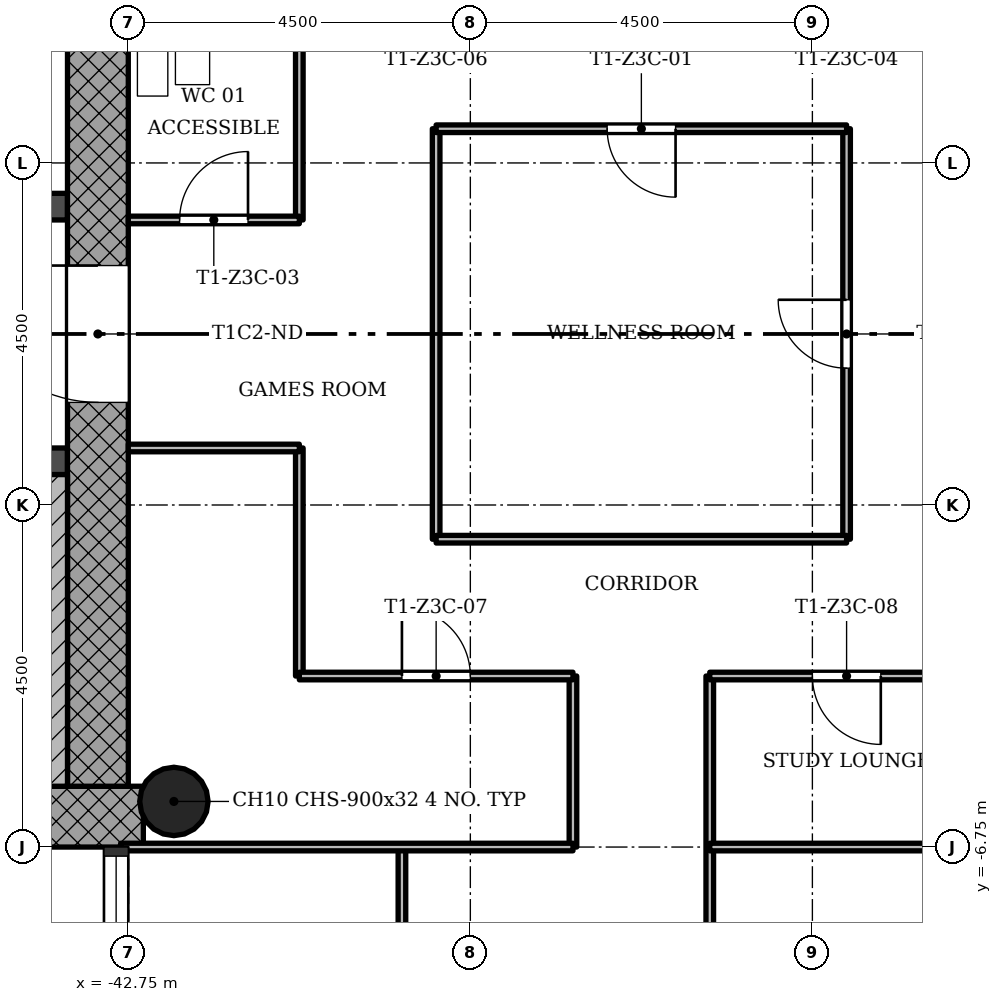
"""IFC4 building model, lengths in metres.
Left out: names, types, materials, properties, quantities, classifications, styles, units other than length and angle.
Written with IfcOpenShell. Run it as: python <this file> out.ifc"""

import sys

from ifc_helpers import new_model, si_unit, direction, frame, frame_2d, origin, origin_2d, place, context, subcontext, project, spatial, rectangle, hollow_circle, extrude, element, fill, save


model = new_model("IFC4")
c1 = context("Model", 3, precision=1e-05, world=origin(), true_north=direction((0.0, 1.0)))
c2 = subcontext(c1, "Body", "Model", "MODEL_VIEW")
j1 = project(units=[si_unit("LENGTHUNIT", "METRE"), si_unit("PLANEANGLEUNIT", "RADIAN")], contexts=[c1])
p1 = place(None, origin())
s1 = spatial("IfcSite", under=j1, at=p1, CompositionType="ELEMENT")
p2 = place(p1, origin())
s2 = spatial("IfcBuilding", under=s1, at=p2, CompositionType="ELEMENT")
p3 = place(p2, frame((0.0, 0.0, 154.1)))
s3 = spatial("IfcBuildingStorey", under=s2, at=p3, CompositionType="ELEMENT", Elevation=154.1)
p4 = place(p3, frame((-50.95, -6.35, 0.0), z_axis=(0.0, 0.0, 1.0), x_axis=(1.0, 0.0, 0.0)))
e1 = element("IfcWall", 1, at=p4, inside=s3, PredefinedType="SHEAR", context=c2, shape_type="SweptSolid", body=[
    extrude(rectangle(XDim=8.398, YDim=0.8, at=frame_2d((4.199, 0.0))), origin(), (0.0, 0.0, 1.0), 3.4),
])
p5 = place(p3, frame((-43.15, -5.95, 0.0), z_axis=(0.0, 0.0, 1.0), x_axis=(0.0, 1.0, 0.0)))
e2 = element("IfcWall", 2, at=p5, inside=s3, PredefinedType="SHEAR", context=c2, shape_type="SweptSolid", body=[
    extrude(rectangle(XDim=12.7, YDim=0.8, at=frame_2d((6.35, 0.0))), origin(), (0.0, 0.0, 1.0), 3.4),
])
p6 = place(p5, frame((5.05, 0.0, 0.0)))
e3 = element("IfcOpeningElement", 3, at=p6, cuts=e2, PredefinedType="OPENING", context=c2, shape_type="SweptSolid", body=[
    extrude(rectangle(XDim=1.8, YDim=2.1, at=frame_2d((0.9, 1.05))), frame((0.0, 0.41, 0.0), z_axis=(0.0, -1.0, 0.0), x_axis=(1.0, 0.0, 0.0)), (0.0, 0.0, 1.0), 0.82),
])
p7 = place(p3, frame((-50.95, -1.675, 0.0), z_axis=(0.0, 0.0, 1.0), x_axis=(1.0, 0.0, 0.0)))
e4 = element("IfcWall", 4, at=p7, inside=s3, PredefinedType="SHEAR", context=c2, shape_type="SweptSolid", body=[
    extrude(rectangle(XDim=7.4, YDim=0.35, at=frame_2d((3.7, 0.0))), origin(), (0.0, 0.0, 1.0), 3.4),
])
p8 = place(p7, frame((5.65, 0.0, 0.0)))
e5 = element("IfcOpeningElement", 5, at=p8, cuts=e4, PredefinedType="OPENING", context=c2, shape_type="SweptSolid", body=[
    extrude(rectangle(XDim=0.9, YDim=2.1, at=frame_2d((0.45, 1.05))), frame((0.0, 0.185, 0.0), z_axis=(0.0, -1.0, 0.0), x_axis=(1.0, 0.0, 0.0)), (0.0, 0.0, 1.0), 0.37),
])
p9 = place(p3, frame((-50.95, 1.675, 0.0), z_axis=(0.0, 0.0, 1.0), x_axis=(1.0, 0.0, 0.0)))
e6 = element("IfcWall", 6, at=p9, inside=s3, PredefinedType="SHEAR", context=c2, shape_type="SweptSolid", body=[
    extrude(rectangle(XDim=7.4, YDim=0.35, at=frame_2d((3.7, 0.0))), origin(), (0.0, 0.0, 1.0), 3.4),
])
p10 = place(p9, frame((5.35, 0.0, 0.0)))
e7 = element("IfcOpeningElement", 7, at=p10, cuts=e6, PredefinedType="OPENING", context=c2, shape_type="SweptSolid", body=[
    extrude(rectangle(XDim=1.1, YDim=2.1, at=frame_2d((0.55, 1.05))), frame((0.0, 0.185, 0.0), z_axis=(0.0, -1.0, 0.0), x_axis=(1.0, 0.0, 0.0)), (0.0, 0.0, 1.0), 0.37),
])
p11 = place(p9, frame((1.0, 0.0, 0.0)))
e8 = element("IfcOpeningElement", 8, at=p11, cuts=e6, PredefinedType="OPENING", context=c2, shape_type="SweptSolid", body=[
    extrude(rectangle(XDim=1.1, YDim=2.1, at=frame_2d((0.55, 1.05))), frame((0.0, 0.185, 0.0), z_axis=(0.0, -1.0, 0.0), x_axis=(1.0, 0.0, 0.0)), (0.0, 0.0, 1.0), 0.37),
])
p12 = place(p9, frame((3.3, 0.0, 0.0)))
e9 = element("IfcOpeningElement", 9, at=p12, cuts=e6, PredefinedType="OPENING", context=c2, shape_type="SweptSolid", body=[
    extrude(rectangle(XDim=0.9, YDim=2.1, at=frame_2d((0.45, 1.05))), frame((0.0, 0.185, 0.0), z_axis=(0.0, -1.0, 0.0), x_axis=(1.0, 0.0, 0.0)), (0.0, 0.0, 1.0), 0.37),
])
p13 = place(p3, frame((-42.15, -6.15, 0.0), z_axis=(0.0, 0.0, 1.0), x_axis=(1.0, 0.0, 0.0)))
e10 = element("IfcColumn", 10, at=p13, inside=s3, PredefinedType="COLUMN", context=c2, shape_type="SweptSolid", body=[
    extrude(hollow_circle(Radius=0.45, WallThickness=0.032, at=origin_2d()), origin(), (0.0, 0.0, 1.0), 3.4),
])
for number, where, z_axis, x_axis in (
    (11, (-40.5, -4.5, 0.0), (0.0, 0.0, 1.0), (0.0, 1.0, 0.0)),
    (12, (-40.5, 1.5, 0.0), (0.0, 0.0, 1.0), (0.0, 1.0, 0.0)),
):
    element("IfcWall", number, at=place(p3, frame(where, z_axis=z_axis, x_axis=x_axis)), inside=s3, PredefinedType="PARTITIONING", context=c2, shape_type="SweptSolid", body=[
        extrude(rectangle(XDim=3.0, YDim=0.1, at=frame_2d((1.5, 0.0))), origin(), (0.0, 0.0, 1.0), 3.0),
    ])
p14 = place(p3, frame((-39.15, -15.75, 0.0), z_axis=(0.0, 0.0, 1.0), x_axis=(0.0, 1.0, 0.0)))
e13 = element("IfcWall", 13, at=p14, inside=s3, PredefinedType="PARTITIONING", context=c2, shape_type="SweptSolid", body=[
    extrude(rectangle(XDim=9.0, YDim=0.1, at=frame_2d((4.5, 0.0))), origin(), (0.0, 0.0, 1.0), 3.0),
])
p15 = place(p14, frame((5.55, 0.0, 0.0)))
e14 = element("IfcOpeningElement", 14, at=p15, cuts=e13, PredefinedType="OPENING", context=c2, shape_type="SweptSolid", body=[
    extrude(rectangle(XDim=0.9, YDim=2.1, at=frame_2d((0.45, 1.05))), frame((0.0, 0.06, 0.0), z_axis=(0.0, -1.0, 0.0), x_axis=(1.0, 0.0, 0.0)), (0.0, 0.0, 1.0), 0.12),
])
p16 = place(p3, frame((-38.7, -2.7, 0.0), z_axis=(0.0, 0.0, 1.0), x_axis=(0.0, 1.0, 0.0)))
e15 = element("IfcWall", 15, at=p16, inside=s3, PredefinedType="PARTITIONING", context=c2, shape_type="SweptSolid", body=[
    extrude(rectangle(XDim=5.4, YDim=0.1, at=frame_2d((2.7, 0.0))), origin(), (0.0, 0.0, 1.0), 3.0),
])
p17 = place(p3, frame((-36.9, -6.75, 0.0), z_axis=(0.0, 0.0, 1.0), x_axis=(0.0, 1.0, 0.0)))
e16 = element("IfcWall", 16, at=p17, inside=s3, PredefinedType="PARTITIONING", context=c2, shape_type="SweptSolid", body=[
    extrude(rectangle(XDim=2.25, YDim=0.1, at=frame_2d((1.125, 0.0))), origin(), (0.0, 0.0, 1.0), 3.0),
])
p18 = place(p3, frame((-35.1, -8.55, 0.0), z_axis=(0.0, 0.0, 1.0), x_axis=(0.0, 1.0, 0.0)))
e17 = element("IfcWall", 17, at=p18, inside=s3, PredefinedType="PARTITIONING", context=c2, shape_type="SweptSolid", body=[
    extrude(rectangle(XDim=4.05, YDim=0.1, at=frame_2d((2.025, 0.0))), origin(), (0.0, 0.0, 1.0), 3.0),
])
p19 = place(p3, frame((-33.3, -2.7, 0.0), z_axis=(0.0, 0.0, 1.0), x_axis=(0.0, 1.0, 0.0)))
e18 = element("IfcWall", 18, at=p19, inside=s3, PredefinedType="PARTITIONING", context=c2, shape_type="SweptSolid", body=[
    extrude(rectangle(XDim=5.4, YDim=0.1, at=frame_2d((2.7, 0.0))), origin(), (0.0, 0.0, 1.0), 3.0),
])
p20 = place(p19, frame((2.25, 0.0, 0.0)))
e19 = element("IfcOpeningElement", 19, at=p20, cuts=e18, PredefinedType="OPENING", context=c2, shape_type="SweptSolid", body=[
    extrude(rectangle(XDim=0.9, YDim=2.1, at=frame_2d((0.45, 1.05))), frame((0.0, 0.06, 0.0), z_axis=(0.0, -1.0, 0.0), x_axis=(1.0, 0.0, 0.0)), (0.0, 0.0, 1.0), 0.12),
])
for number, where, z_axis, x_axis in (
    (20, (-42.85, -6.75, 0.0), (0.0, 0.0, 1.0), (1.0, 0.0, 0.0)),
    (21, (-35.1, -6.75, 0.0), (0.0, 0.0, 1.0), (1.0, 0.0, 0.0)),
):
    element("IfcWall", number, at=place(p3, frame(where, z_axis=z_axis, x_axis=x_axis)), inside=s3, PredefinedType="PARTITIONING", context=c2, shape_type="SweptSolid", body=[
        extrude(rectangle(XDim=5.95, YDim=0.1, at=frame_2d((2.975, 0.0))), origin(), (0.0, 0.0, 1.0), 3.0),
    ])
p21 = place(p3, frame((-40.5, -4.5, 0.0), z_axis=(0.0, 0.0, 1.0), x_axis=(1.0, 0.0, 0.0)))
e22 = element("IfcWall", 22, at=p21, inside=s3, PredefinedType="PARTITIONING", context=c2, shape_type="SweptSolid", body=[
    extrude(rectangle(XDim=3.6, YDim=0.1, at=frame_2d((1.8, 0.0))), origin(), (0.0, 0.0, 1.0), 3.0),
])
p22 = place(p21, frame((1.35, 0.0, 0.0)))
e23 = element("IfcOpeningElement", 23, at=p22, cuts=e22, PredefinedType="OPENING", context=c2, shape_type="SweptSolid", body=[
    extrude(rectangle(XDim=0.9, YDim=2.1, at=frame_2d((0.45, 1.05))), frame((0.0, 0.06, 0.0), z_axis=(0.0, -1.0, 0.0), x_axis=(1.0, 0.0, 0.0)), (0.0, 0.0, 1.0), 0.12),
])
p23 = place(p3, frame((-35.1, -4.5, 0.0), z_axis=(0.0, 0.0, 1.0), x_axis=(1.0, 0.0, 0.0)))
e24 = element("IfcWall", 24, at=p23, inside=s3, PredefinedType="PARTITIONING", context=c2, shape_type="SweptSolid", body=[
    extrude(rectangle(XDim=3.6, YDim=0.1, at=frame_2d((1.8, 0.0))), origin(), (0.0, 0.0, 1.0), 3.0),
])
p24 = place(p23, frame((1.35, 0.0, 0.0)))
e25 = element("IfcOpeningElement", 25, at=p24, cuts=e24, PredefinedType="OPENING", context=c2, shape_type="SweptSolid", body=[
    extrude(rectangle(XDim=0.9, YDim=2.1, at=frame_2d((0.45, 1.05))), frame((0.0, 0.06, 0.0), z_axis=(0.0, -1.0, 0.0), x_axis=(1.0, 0.0, 0.0)), (0.0, 0.0, 1.0), 0.12),
])
p25 = place(p3, frame((-38.7, -2.7, 0.0), z_axis=(0.0, 0.0, 1.0), x_axis=(1.0, 0.0, 0.0)))
e26 = element("IfcWall", 26, at=p25, inside=s3, PredefinedType="PARTITIONING", context=c2, shape_type="SweptSolid", body=[
    extrude(rectangle(XDim=5.4, YDim=0.1, at=frame_2d((2.7, 0.0))), origin(), (0.0, 0.0, 1.0), 3.0),
])
p26 = place(p3, frame((-42.75, -1.5, 0.0), z_axis=(0.0, 0.0, 1.0), x_axis=(1.0, 0.0, 0.0)))
e27 = element("IfcWall", 27, at=p26, inside=s3, PredefinedType="PARTITIONING", context=c2, shape_type="SweptSolid", body=[
    extrude(rectangle(XDim=2.25, YDim=0.1, at=frame_2d((1.125, 0.0))), origin(), (0.0, 0.0, 1.0), 3.0),
])
p27 = place(p3, frame((-42.75, 1.5, 0.0), z_axis=(0.0, 0.0, 1.0), x_axis=(1.0, 0.0, 0.0)))
e28 = element("IfcWall", 28, at=p27, inside=s3, PredefinedType="PARTITIONING", context=c2, shape_type="SweptSolid", body=[
    extrude(rectangle(XDim=2.25, YDim=0.1, at=frame_2d((1.125, 0.0))), origin(), (0.0, 0.0, 1.0), 3.0),
])
p28 = place(p27, frame((0.675, 0.0, 0.0)))
e29 = element("IfcOpeningElement", 29, at=p28, cuts=e28, PredefinedType="OPENING", context=c2, shape_type="SweptSolid", body=[
    extrude(rectangle(XDim=0.9, YDim=2.1, at=frame_2d((0.45, 1.05))), frame((0.0, 0.06, 0.0), z_axis=(0.0, -1.0, 0.0), x_axis=(1.0, 0.0, 0.0)), (0.0, 0.0, 1.0), 0.12),
])
p29 = place(p3, frame((-38.7, 2.7, 0.0), z_axis=(0.0, 0.0, 1.0), x_axis=(1.0, 0.0, 0.0)))
e30 = element("IfcWall", 30, at=p29, inside=s3, PredefinedType="PARTITIONING", context=c2, shape_type="SweptSolid", body=[
    extrude(rectangle(XDim=5.4, YDim=0.1, at=frame_2d((2.7, 0.0))), origin(), (0.0, 0.0, 1.0), 3.0),
])
p30 = place(p29, frame((2.25, 0.0, 0.0)))
e31 = element("IfcOpeningElement", 31, at=p30, cuts=e30, PredefinedType="OPENING", context=c2, shape_type="SweptSolid", body=[
    extrude(rectangle(XDim=0.9, YDim=2.1, at=frame_2d((0.45, 1.05))), frame((0.0, 0.06, 0.0), z_axis=(0.0, -1.0, 0.0), x_axis=(1.0, 0.0, 0.0)), (0.0, 0.0, 1.0), 0.12),
])
p31 = place(p3, frame((-43.75, -1.85, 0.0), z_axis=(0.0, 0.0, 1.0), x_axis=(0.0, -1.0, 0.0)))
e32 = element("IfcWall", 32, at=p31, inside=s3, PredefinedType="SHEAR", context=c2, shape_type="SweptSolid", body=[
    extrude(rectangle(XDim=4.1, YDim=0.4, at=frame_2d((2.05, 0.0))), origin(), (0.0, 0.0, 1.0), 3.4),
])
p32 = place(p30, origin())
e33 = element("IfcDoor", 33, at=p32, inside=s3, OperationType="SINGLE_SWING_RIGHT", PredefinedType="DOOR", context=c2, shape_type="SweptSolid", body=[
    extrude(rectangle(XDim=0.9, YDim=2.1, at=frame_2d((0.45, 1.05))), frame((0.0, 0.025, 0.0), z_axis=(0.0, -1.0, 0.0), x_axis=(1.0, 0.0, 0.0)), (0.0, 0.0, 1.0), 0.05),
])
fill(e31, e33)
p33 = place(p20, origin())
e34 = element("IfcDoor", 34, at=p33, inside=s3, OperationType="SINGLE_SWING_LEFT", PredefinedType="DOOR", context=c2, shape_type="SweptSolid", body=[
    extrude(rectangle(XDim=0.9, YDim=2.1, at=frame_2d((0.45, 1.05))), frame((0.0, 0.025, 0.0), z_axis=(0.0, -1.0, 0.0), x_axis=(1.0, 0.0, 0.0)), (0.0, 0.0, 1.0), 0.05),
])
fill(e19, e34)
p34 = place(p28, origin())
e35 = element("IfcDoor", 35, at=p34, inside=s3, OperationType="SINGLE_SWING_LEFT", PredefinedType="DOOR", context=c2, shape_type="SweptSolid", body=[
    extrude(rectangle(XDim=0.9, YDim=2.1, at=frame_2d((0.45, 1.05))), frame((0.0, 0.025, 0.0), z_axis=(0.0, -1.0, 0.0), x_axis=(1.0, 0.0, 0.0)), (0.0, 0.0, 1.0), 0.05),
])
fill(e29, e35)
p35 = place(p22, origin())
e36 = element("IfcDoor", 36, at=p35, inside=s3, OperationType="SINGLE_SWING_RIGHT", PredefinedType="DOOR", context=c2, shape_type="SweptSolid", body=[
    extrude(rectangle(XDim=0.9, YDim=2.1, at=frame_2d((0.45, 1.05))), frame((0.0, 0.025, 0.0), z_axis=(0.0, -1.0, 0.0), x_axis=(1.0, 0.0, 0.0)), (0.0, 0.0, 1.0), 0.05),
])
fill(e23, e36)
p36 = place(p24, origin())
e37 = element("IfcDoor", 37, at=p36, inside=s3, OperationType="SINGLE_SWING_RIGHT", PredefinedType="DOOR", context=c2, shape_type="SweptSolid", body=[
    extrude(rectangle(XDim=0.9, YDim=2.1, at=frame_2d((0.45, 1.05))), frame((0.0, 0.025, 0.0), z_axis=(0.0, -1.0, 0.0), x_axis=(1.0, 0.0, 0.0)), (0.0, 0.0, 1.0), 0.05),
])
fill(e25, e37)
p37 = place(p6, origin())
e38 = element("IfcDoor", 38, at=p37, inside=s3, OperationType="SINGLE_SWING_LEFT", PredefinedType="DOOR", context=c2, shape_type="SweptSolid", body=[
    extrude(rectangle(XDim=1.8, YDim=2.1, at=frame_2d((0.9, 1.05))), frame((0.0, 0.025, 0.0), z_axis=(0.0, -1.0, 0.0), x_axis=(1.0, 0.0, 0.0)), (0.0, 0.0, 1.0), 0.05),
])
fill(e3, e38)
save(model, sys.argv[1])
